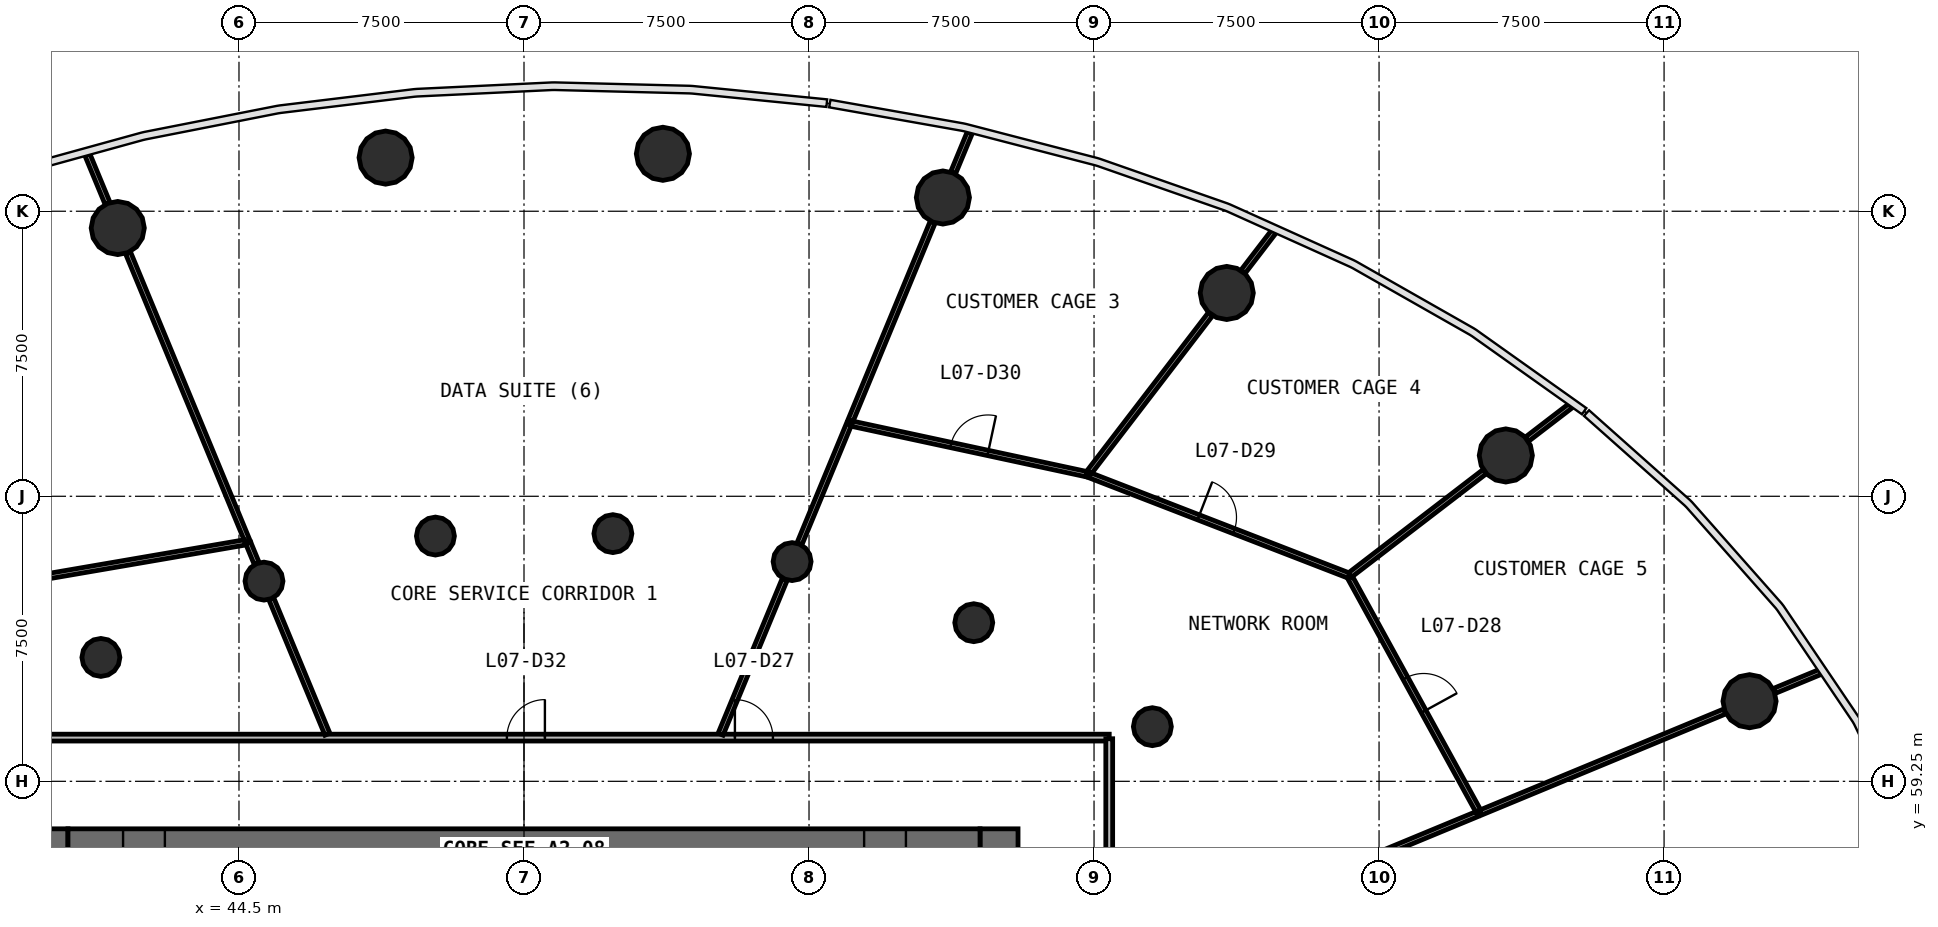
"""IFC4 building model, lengths in metres.
Left out: names, types, materials, properties, quantities, classifications, styles, units other than length and angle.
Written with IfcOpenShell. Run it as: python <this file> out.ifc"""

import sys

from ifc_helpers import new_model, si_unit, direction, frame, frame_2d, origin, origin_2d, place, context, subcontext, project, spatial, rectangle, circle, extrude, source, transform, mapped, element, fill, save


model = new_model("IFC4")
c1 = context("Model", 3, precision=1e-05, world=origin(), true_north=direction((0.0, 1.0)))
c2 = subcontext(c1, "Body", "Model", "MODEL_VIEW")
j1 = project(units=[si_unit("LENGTHUNIT", "METRE"), si_unit("PLANEANGLEUNIT", "RADIAN")], contexts=[c1])
p1 = place(None, origin())
s1 = spatial("IfcSite", under=j1, at=p1, CompositionType="ELEMENT")
p2 = place(p1, origin())
s2 = spatial("IfcBuilding", under=s1, at=p2, CompositionType="ELEMENT")
p3 = place(p2, frame((0.0, 0.0, 31.4)))
s3 = spatial("IfcBuildingStorey", under=s2, at=p3, CompositionType="ELEMENT", Elevation=31.4)
p4 = place(p3, frame((64.5, 38.0, 0.0), z_axis=(0.0, 0.0, 1.0), x_axis=(0.0, 1.0, 0.0)))
e1 = element("IfcWall", 1, at=p4, inside=s3, PredefinedType="SHEAR", context=c2, shape_type="SweptSolid", body=[
    extrude(rectangle(XDim=20.0, YDim=1.0, at=frame_2d((10.0, 0.0))), origin(), (0.0, 0.0, 1.0), 4.4),
])
p5 = place(p4, frame((9.1, 0.0, 0.0)))
e2 = element("IfcOpeningElement", 2, at=p5, cuts=e1, PredefinedType="OPENING", context=c2, shape_type="SweptSolid", body=[
    extrude(rectangle(XDim=1.8, YDim=2.1, at=frame_2d((0.9, 1.05))), frame((0.0, 0.51, 0.0), z_axis=(0.0, -1.0, 0.0), x_axis=(1.0, 0.0, 0.0)), (0.0, 0.0, 1.0), 1.02),
])
p6 = place(p3, frame((39.5, 58.0, 0.0), z_axis=(0.0, 0.0, 1.0), x_axis=(0.0, -1.0, 0.0)))
e3 = element("IfcWall", 3, at=p6, inside=s3, PredefinedType="SHEAR", context=c2, shape_type="SweptSolid", body=[
    extrude(rectangle(XDim=20.0, YDim=1.0, at=frame_2d((10.0, 0.0))), origin(), (0.0, 0.0, 1.0), 4.4),
])
p7 = place(p6, frame((9.1, 0.0, 0.0)))
e4 = element("IfcOpeningElement", 4, at=p7, cuts=e3, PredefinedType="OPENING", context=c2, shape_type="SweptSolid", body=[
    extrude(rectangle(XDim=1.8, YDim=2.1, at=frame_2d((0.9, 1.05))), frame((0.0, 0.51, 0.0), z_axis=(0.0, -1.0, 0.0), x_axis=(1.0, 0.0, 0.0)), (0.0, 0.0, 1.0), 1.02),
])
p8 = place(p3, frame((64.0, 57.5, 0.0), z_axis=(0.0, 0.0, 1.0), x_axis=(-1.0, 0.0, 0.0)))
e5 = element("IfcWall", 5, at=p8, inside=s3, PredefinedType="SHEAR", context=c2, shape_type="SweptSolid", body=[
    extrude(rectangle(XDim=24.0, YDim=1.0, at=frame_2d((12.0, 0.0))), origin(), (0.0, 0.0, 1.0), 4.4),
])
p9 = place(p8, frame((21.45, 0.0, 0.0)))
e6 = element("IfcOpeningElement", 6, at=p9, cuts=e5, PredefinedType="OPENING", context=c2, shape_type="SweptSolid", body=[
    extrude(rectangle(XDim=1.1, YDim=2.1, at=frame_2d((0.55, 1.05))), frame((0.0, 0.51, 0.0), z_axis=(0.0, -1.0, 0.0), x_axis=(1.0, 0.0, 0.0)), (0.0, 0.0, 1.0), 1.02),
])
p10 = place(p8, frame((1.95, 0.0, 0.0)))
e7 = element("IfcOpeningElement", 7, at=p10, cuts=e5, PredefinedType="OPENING", context=c2, shape_type="SweptSolid", body=[
    extrude(rectangle(XDim=1.1, YDim=2.1, at=frame_2d((0.55, 1.05))), frame((0.0, 0.51, 0.0), z_axis=(0.0, -1.0, 0.0), x_axis=(1.0, 0.0, 0.0)), (0.0, 0.0, 1.0), 1.02),
])
m1 = source(origin(), c2, "Body", "SweptSolid", [
    extrude(circle(Radius=0.7, at=origin_2d()), origin(), (0.0, 0.0, 1.0), 4.4),
])
for number, where, z_axis, x_axis in (
    (8, (84.249, 61.358, 0.0), (0.0, 0.0, 1.0), (1.0, 0.0, 0.0)),
    (9, (77.836, 67.824, 0.0), (0.0, 0.0, 1.0), (1.0, 0.0, 0.0)),
    (10, (70.492, 72.1, 0.0), (0.0, 0.0, 1.0), (1.0, 0.0, 0.0)),
    (11, (63.023, 74.611, 0.0), (0.0, 0.0, 1.0), (1.0, 0.0, 0.0)),
    (12, (55.655, 75.761, 0.0), (0.0, 0.0, 1.0), (1.0, 0.0, 0.0)),
    (13, (48.358, 75.661, 0.0), (0.0, 0.0, 1.0), (1.0, 0.0, 0.0)),
    (14, (41.31, 73.809, 0.0), (0.0, 0.0, 1.0), (1.0, 0.0, 0.0)),
):
    element("IfcColumn", number, at=place(p3, frame(where, z_axis=z_axis, x_axis=x_axis)), inside=s3, PredefinedType="COLUMN", context=c2, shape_type="MappedRepresentation", body=[
        mapped(m1, transform((0.0, 0.0, 0.0), scale=1.0)),
    ])
m2 = source(origin(), c2, "Body", "SweptSolid", [
    extrude(circle(Radius=0.5, at=origin_2d()), origin(), (0.0, 0.0, 1.0), 4.4),
])
for number, where, z_axis, x_axis in (
    (15, (68.535, 60.688, 0.0), (0.0, 0.0, 1.0), (1.0, 0.0, 0.0)),
    (16, (63.835, 63.424, 0.0), (0.0, 0.0, 1.0), (1.0, 0.0, 0.0)),
    (17, (59.055, 65.031, 0.0), (0.0, 0.0, 1.0), (1.0, 0.0, 0.0)),
    (18, (54.339, 65.767, 0.0), (0.0, 0.0, 1.0), (1.0, 0.0, 0.0)),
    (19, (49.669, 65.703, 0.0), (0.0, 0.0, 1.0), (1.0, 0.0, 0.0)),
    (20, (45.158, 64.518, 0.0), (0.0, 0.0, 1.0), (1.0, 0.0, 0.0)),
    (21, (40.866, 62.51, 0.0), (0.0, 0.0, 1.0), (1.0, 0.0, 0.0)),
):
    element("IfcColumn", number, at=place(p3, frame(where, z_axis=z_axis, x_axis=x_axis)), inside=s3, PredefinedType="COLUMN", context=c2, shape_type="MappedRepresentation", body=[
        mapped(m2, transform((0.0, 0.0, 0.0), scale=1.0)),
    ])
p11 = place(p3, frame((36.6, 60.4, 0.0), z_axis=(0.0, 0.0, 1.0), x_axis=(1.0, 0.0, 0.0)))
e22 = element("IfcWall", 22, at=p11, inside=s3, PredefinedType="PARTITIONING", context=c2, shape_type="SweptSolid", body=[
    extrude(rectangle(XDim=30.8, YDim=0.18, at=frame_2d((15.4, 0.0))), origin(), (0.0, 0.0, 1.0), 3.05),
])
p12 = place(p11, frame((20.95, 0.0, 0.0)))
e23 = element("IfcOpeningElement", 23, at=p12, cuts=e22, PredefinedType="OPENING", context=c2, shape_type="SweptSolid", body=[
    extrude(rectangle(XDim=1.0, YDim=2.1, at=frame_2d((0.5, 1.05))), frame((0.0, 0.1, 0.0), z_axis=(0.0, -1.0, 0.0), x_axis=(1.0, 0.0, 0.0)), (0.0, 0.0, 1.0), 0.2),
])
p13 = place(p11, frame((14.95, 0.0, 0.0)))
e24 = element("IfcOpeningElement", 24, at=p13, cuts=e22, PredefinedType="OPENING", context=c2, shape_type="SweptSolid", body=[
    extrude(rectangle(XDim=1.0, YDim=2.1, at=frame_2d((0.5, 1.05))), frame((0.0, 0.1, 0.0), z_axis=(0.0, -1.0, 0.0), x_axis=(1.0, 0.0, 0.0)), (0.0, 0.0, 1.0), 0.2),
])
p14 = place(p3, frame((67.4, 60.37, 0.0), z_axis=(0.0, 0.0, 1.0), x_axis=(0.0, -1.0, 0.0)))
e25 = element("IfcWall", 25, at=p14, inside=s3, PredefinedType="PARTITIONING", context=c2, shape_type="SweptSolid", body=[
    extrude(rectangle(XDim=23.583, YDim=0.18, at=frame_2d((11.791, 0.0))), origin(), (0.0, 0.0, 1.0), 3.05),
])
p15 = place(p14, frame((11.833, 0.0, 0.0)))
e26 = element("IfcOpeningElement", 26, at=p15, cuts=e25, PredefinedType="OPENING", context=c2, shape_type="SweptSolid", body=[
    extrude(rectangle(XDim=0.9, YDim=2.1, at=frame_2d((0.45, 1.05))), frame((0.0, 0.1, 0.0), z_axis=(0.0, -1.0, 0.0), x_axis=(1.0, 0.0, 0.0)), (0.0, 0.0, 1.0), 0.2),
])
p16 = place(p14, frame((10.433, 0.0, 0.0)))
e27 = element("IfcOpeningElement", 27, at=p16, cuts=e25, PredefinedType="OPENING", context=c2, shape_type="SweptSolid", body=[
    extrude(rectangle(XDim=0.9, YDim=2.1, at=frame_2d((0.45, 1.05))), frame((0.0, 0.1, 0.0), z_axis=(0.0, -1.0, 0.0), x_axis=(1.0, 0.0, 0.0)), (0.0, 0.0, 1.0), 0.2),
])
p17 = place(p14, frame((7.833, 0.0, 0.0)))
e28 = element("IfcOpeningElement", 28, at=p17, cuts=e25, PredefinedType="OPENING", context=c2, shape_type="SweptSolid", body=[
    extrude(rectangle(XDim=0.9, YDim=2.1, at=frame_2d((0.45, 1.05))), frame((0.0, 0.1, 0.0), z_axis=(0.0, -1.0, 0.0), x_axis=(1.0, 0.0, 0.0)), (0.0, 0.0, 1.0), 0.2),
])
p18 = place(p14, frame((14.732, 0.0, 0.0)))
e29 = element("IfcOpeningElement", 29, at=p18, cuts=e25, PredefinedType="OPENING", context=c2, shape_type="SweptSolid", body=[
    extrude(rectangle(XDim=1.0, YDim=2.1, at=frame_2d((0.5, 1.05))), frame((0.0, 0.1, 0.0), z_axis=(0.0, -1.0, 0.0), x_axis=(1.0, 0.0, 0.0)), (0.0, 0.0, 1.0), 0.2),
])
p19 = place(p3, frame((44.731, 65.549, 0.0), z_axis=(0.0, 0.0, 1.0), x_axis=(-0.382679959388, 0.923880971058, 0.0)))
e30 = element("IfcWall", 30, at=p19, inside=s3, PredefinedType="PARTITIONING", context=c2, shape_type="SweptSolid", body=[
    extrude(rectangle(XDim=8.235, YDim=0.14, at=frame_2d((4.118, 0.0))), origin(), (0.0, 0.0, 1.0), 3.05),
])
p20 = place(p3, frame((66.829, 67.326, 0.0), z_axis=(0.0, 0.0, 1.0), x_axis=(0.932497314738, -0.361176906801, 0.0)))
e31 = element("IfcWall", 31, at=p20, inside=s3, PredefinedType="PARTITIONING", context=c2, shape_type="SweptSolid", body=[
    extrude(rectangle(XDim=7.381, YDim=0.14, at=frame_2d((3.69, 0.0))), origin(), (0.0, 0.0, 1.0), 3.05),
])
p21 = place(p20, frame((3.131, 0.0, 0.0)))
e32 = element("IfcOpeningElement", 32, at=p21, cuts=e31, PredefinedType="OPENING", context=c2, shape_type="SweptSolid", body=[
    extrude(rectangle(XDim=1.0, YDim=2.1, at=frame_2d((0.5, 1.05))), frame((0.0, 0.08, 0.0), z_axis=(0.0, -1.0, 0.0), x_axis=(1.0, 0.0, 0.0)), (0.0, 0.0, 1.0), 0.16),
])
p22 = place(p3, frame((73.726, 64.634, 0.0), z_axis=(0.0, 0.0, 1.0), x_axis=(0.481181569965, -0.876620953848, 0.0)))
e33 = element("IfcWall", 33, at=p22, inside=s3, PredefinedType="PARTITIONING", context=c2, shape_type="SweptSolid", body=[
    extrude(rectangle(XDim=7.096, YDim=0.14, at=frame_2d((3.548, 0.0))), origin(), (0.0, 0.0, 1.0), 3.05),
])
p23 = place(p22, frame((3.046, 0.0, 0.0)))
e34 = element("IfcOpeningElement", 34, at=p23, cuts=e33, PredefinedType="OPENING", context=c2, shape_type="SweptSolid", body=[
    extrude(rectangle(XDim=1.0, YDim=2.1, at=frame_2d((0.5, 1.05))), frame((0.0, 0.08, 0.0), z_axis=(0.0, -1.0, 0.0), x_axis=(1.0, 0.0, 0.0)), (0.0, 0.0, 1.0), 0.16),
])
p24 = place(p3, frame((77.168, 58.425, 0.0), z_axis=(0.0, 0.0, 1.0), x_axis=(0.923883429162, 0.382674024883, 0.0)))
e35 = element("IfcWall", 35, at=p24, inside=s3, PredefinedType="PARTITIONING", context=c2, shape_type="SweptSolid", body=[
    extrude(rectangle(XDim=6.959, YDim=0.14, at=frame_2d((3.479, 0.0))), origin(), (0.0, 0.0, 1.0), 3.05),
])
p25 = place(p3, frame((60.563, 68.674, 0.0), z_axis=(0.0, 0.0, 1.0), x_axis=(0.977621151311, -0.210373202926, 0.0)))
e36 = element("IfcWall", 36, at=p25, inside=s3, PredefinedType="PARTITIONING", context=c2, shape_type="SweptSolid", body=[
    extrude(rectangle(XDim=6.379, YDim=0.14, at=frame_2d((3.19, 0.0))), origin(), (0.0, 0.0, 1.0), 3.05),
])
p26 = place(p25, frame((2.729, 0.0, 0.0)))
e37 = element("IfcOpeningElement", 37, at=p26, cuts=e36, PredefinedType="OPENING", context=c2, shape_type="SweptSolid", body=[
    extrude(rectangle(XDim=1.0, YDim=2.1, at=frame_2d((0.5, 1.05))), frame((0.0, 0.08, 0.0), z_axis=(0.0, -1.0, 0.0), x_axis=(1.0, 0.0, 0.0)), (0.0, 0.0, 1.0), 0.16),
])
p27 = place(p3, frame((60.591, 68.74, 0.0), z_axis=(0.0, 0.0, 1.0), x_axis=(0.382657084758, 0.923890445607, 0.0)))
e38 = element("IfcWall", 38, at=p27, inside=s3, PredefinedType="PARTITIONING", context=c2, shape_type="SweptSolid", body=[
    extrude(rectangle(XDim=5.65, YDim=0.14, at=frame_2d((2.825, 0.0))), origin(), (0.0, 0.0, 1.0), 3.05),
])
p28 = place(p3, frame((44.66, 65.537, 0.0), z_axis=(0.0, 0.0, 1.0), x_axis=(-0.985578769271, -0.169217285058, 0.0)))
e39 = element("IfcWall", 39, at=p28, inside=s3, PredefinedType="PARTITIONING", context=c2, shape_type="SweptSolid", body=[
    extrude(rectangle(XDim=5.454, YDim=0.14, at=frame_2d((2.727, 0.0))), origin(), (0.0, 0.0, 1.0), 3.05),
])
p29 = place(p3, frame((66.874, 67.384, 0.0), z_axis=(0.0, 0.0, 1.0), x_axis=(0.608760140139, 0.793354329274, 0.0)))
e40 = element("IfcWall", 40, at=p29, inside=s3, PredefinedType="PARTITIONING", context=c2, shape_type="SweptSolid", body=[
    extrude(rectangle(XDim=5.24, YDim=0.14, at=frame_2d((2.62, 0.0))), origin(), (0.0, 0.0, 1.0), 3.05),
])
p30 = place(p3, frame((57.174, 60.49, 0.0), z_axis=(0.0, 0.0, 1.0), x_axis=(0.382672831764, 0.923883923353, 0.0)))
e41 = element("IfcWall", 41, at=p30, inside=s3, PredefinedType="PARTITIONING", context=c2, shape_type="SweptSolid", body=[
    extrude(rectangle(XDim=4.41, YDim=0.14, at=frame_2d((2.205, 0.0))), origin(), (0.0, 0.0, 1.0), 3.05),
])
p31 = place(p3, frame((73.736, 64.678, 0.0), z_axis=(0.0, 0.0, 1.0), x_axis=(0.793381815568, 0.608724317508, 0.0)))
e42 = element("IfcWall", 42, at=p31, inside=s3, PredefinedType="PARTITIONING", context=c2, shape_type="SweptSolid", body=[
    extrude(rectangle(XDim=4.463, YDim=0.14, at=frame_2d((2.232, 0.0))), origin(), (0.0, 0.0, 1.0), 3.05),
])
p32 = place(p3, frame((73.106, 56.742, 0.0), z_axis=(0.0, 0.0, 1.0), x_axis=(0.9238617037, 0.382726472086, 0.0)))
e43 = element("IfcWall", 43, at=p32, inside=s3, PredefinedType="PARTITIONING", context=c2, shape_type="SweptSolid", body=[
    extrude(rectangle(XDim=4.297, YDim=0.14, at=frame_2d((2.148, 0.0))), origin(), (0.0, 0.0, 1.0), 3.05),
])
p33 = place(p3, frame((46.826, 60.49, 0.0), z_axis=(0.0, 0.0, 1.0), x_axis=(-0.382644558062, 0.923895633817, 0.0)))
e44 = element("IfcWall", 44, at=p33, inside=s3, PredefinedType="PARTITIONING", context=c2, shape_type="SweptSolid", body=[
    extrude(rectangle(XDim=3.854, YDim=0.14, at=frame_2d((1.927, 0.0))), origin(), (0.0, 0.0, 1.0), 3.05),
])
p34 = place(p3, frame((59.248, 65.498, 0.0), z_axis=(0.0, 0.0, 1.0), x_axis=(0.382676564955, 0.923882377056, 0.0)))
e45 = element("IfcWall", 45, at=p34, inside=s3, PredefinedType="PARTITIONING", context=c2, shape_type="SweptSolid", body=[
    extrude(rectangle(XDim=3.408, YDim=0.14, at=frame_2d((1.704, 0.0))), origin(), (0.0, 0.0, 1.0), 3.05),
])
p35 = place(p3, frame((78.394, 68.253, 0.0), z_axis=(0.0, 0.0, 1.0), x_axis=(0.793328341426, 0.608794006779, 0.0)))
e46 = element("IfcWall", 46, at=p35, inside=s3, PredefinedType="PARTITIONING", context=c2, shape_type="SweptSolid", body=[
    extrude(rectangle(XDim=1.442, YDim=0.14, at=frame_2d((0.721, 0.0))), origin(), (0.0, 0.0, 1.0), 3.05),
])
p36 = place(p3, frame((41.04, 74.46, 0.0), z_axis=(0.0, 0.0, 1.0), x_axis=(-0.382579541027, 0.923922558869, 0.0)))
e47 = element("IfcWall", 47, at=p36, inside=s3, PredefinedType="PARTITIONING", context=c2, shape_type="SweptSolid", body=[
    extrude(rectangle(XDim=1.389, YDim=0.14, at=frame_2d((0.694, 0.0))), origin(), (0.0, 0.0, 1.0), 3.05),
])
p37 = place(p3, frame((70.921, 72.658, 0.0), z_axis=(0.0, 0.0, 1.0), x_axis=(0.608845512284, 0.793288813845, 0.0)))
e48 = element("IfcWall", 48, at=p37, inside=s3, PredefinedType="PARTITIONING", context=c2, shape_type="SweptSolid", body=[
    extrude(rectangle(XDim=1.337, YDim=0.14, at=frame_2d((0.668, 0.0))), origin(), (0.0, 0.0, 1.0), 3.05),
])
p38 = place(p3, frame((84.9, 61.628, 0.0), z_axis=(0.0, 0.0, 1.0), x_axis=(0.923887406181, 0.382664423091, 0.0)))
e49 = element("IfcWall", 49, at=p38, inside=s3, PredefinedType="PARTITIONING", context=c2, shape_type="SweptSolid", body=[
    extrude(rectangle(XDim=1.333, YDim=0.14, at=frame_2d((0.667, 0.0))), origin(), (0.0, 0.0, 1.0), 3.05),
])
p39 = place(p3, frame((63.292, 75.263, 0.0), z_axis=(0.0, 0.0, 1.0), x_axis=(0.382813709002, 0.9238255594, 0.0)))
e50 = element("IfcWall", 50, at=p39, inside=s3, PredefinedType="PARTITIONING", context=c2, shape_type="SweptSolid", body=[
    extrude(rectangle(XDim=1.136, YDim=0.14, at=frame_2d((0.568, 0.0))), origin(), (0.0, 0.0, 1.0), 3.05),
])
p40 = place(p3, frame((44.965, 64.984, 0.0), z_axis=(0.0, 0.0, 1.0), x_axis=(-0.382945109993, 0.923771098667, 0.0)))
e51 = element("IfcWall", 51, at=p40, inside=s3, PredefinedType="PARTITIONING", context=c2, shape_type="SweptSolid", body=[
    extrude(rectangle(XDim=0.582, YDim=0.14, at=frame_2d((0.291, 0.0))), origin(), (0.0, 0.0, 1.0), 3.05),
])
m3 = source(origin(), c2, "Body", "SweptSolid", [
    extrude(rectangle(XDim=1.1, YDim=2.1, at=frame_2d((0.55, 1.05))), frame((0.0, 0.025, 0.0), z_axis=(0.0, -1.0, 0.0), x_axis=(1.0, 0.0, 0.0)), (0.0, 0.0, 1.0), 0.05),
])
p41 = place(p9, origin())
e52 = element("IfcDoor", 52, at=p41, inside=s3, OperationType="SINGLE_SWING_RIGHT", PredefinedType="DOOR", context=c2, shape_type="MappedRepresentation", body=[
    mapped(m3, transform((0.0, 0.0, 0.0), scale=1.0)),
])
fill(e6, e52)
p42 = place(p10, origin())
e53 = element("IfcDoor", 53, at=p42, inside=s3, OperationType="SINGLE_SWING_LEFT", PredefinedType="DOOR", context=c2, shape_type="MappedRepresentation", body=[
    mapped(m3, transform((0.0, 0.0, 0.0), scale=1.0)),
])
fill(e7, e53)
m4 = source(origin(), c2, "Body", "SweptSolid", [
    extrude(rectangle(XDim=1.0, YDim=2.1, at=frame_2d((0.5, 1.05))), frame((0.0, 0.025, 0.0), z_axis=(0.0, -1.0, 0.0), x_axis=(1.0, 0.0, 0.0)), (0.0, 0.0, 1.0), 0.05),
])
p43 = place(p12, origin())
e54 = element("IfcDoor", 54, at=p43, inside=s3, OperationType="SINGLE_SWING_LEFT", PredefinedType="DOOR", context=c2, shape_type="MappedRepresentation", body=[
    mapped(m4, transform((0.0, 0.0, 0.0), scale=1.0)),
])
fill(e23, e54)
p44 = place(p23, origin())
e55 = element("IfcDoor", 55, at=p44, inside=s3, OperationType="SINGLE_SWING_RIGHT", PredefinedType="DOOR", context=c2, shape_type="MappedRepresentation", body=[
    mapped(m4, transform((0.0, 0.0, 0.0), scale=1.0)),
])
fill(e34, e55)
p45 = place(p21, origin())
e56 = element("IfcDoor", 56, at=p45, inside=s3, OperationType="SINGLE_SWING_LEFT", PredefinedType="DOOR", context=c2, shape_type="MappedRepresentation", body=[
    mapped(m4, transform((0.0, 0.0, 0.0), scale=1.0)),
])
fill(e32, e56)
p46 = place(p26, origin())
e57 = element("IfcDoor", 57, at=p46, inside=s3, OperationType="SINGLE_SWING_RIGHT", PredefinedType="DOOR", context=c2, shape_type="MappedRepresentation", body=[
    mapped(m4, transform((0.0, 0.0, 0.0), scale=1.0)),
])
fill(e37, e57)
p47 = place(p13, origin())
e58 = element("IfcDoor", 58, at=p47, inside=s3, OperationType="SINGLE_SWING_RIGHT", PredefinedType="DOOR", context=c2, shape_type="MappedRepresentation", body=[
    mapped(m4, transform((0.0, 0.0, 0.0), scale=1.0)),
])
fill(e24, e58)
save(model, sys.argv[1])
